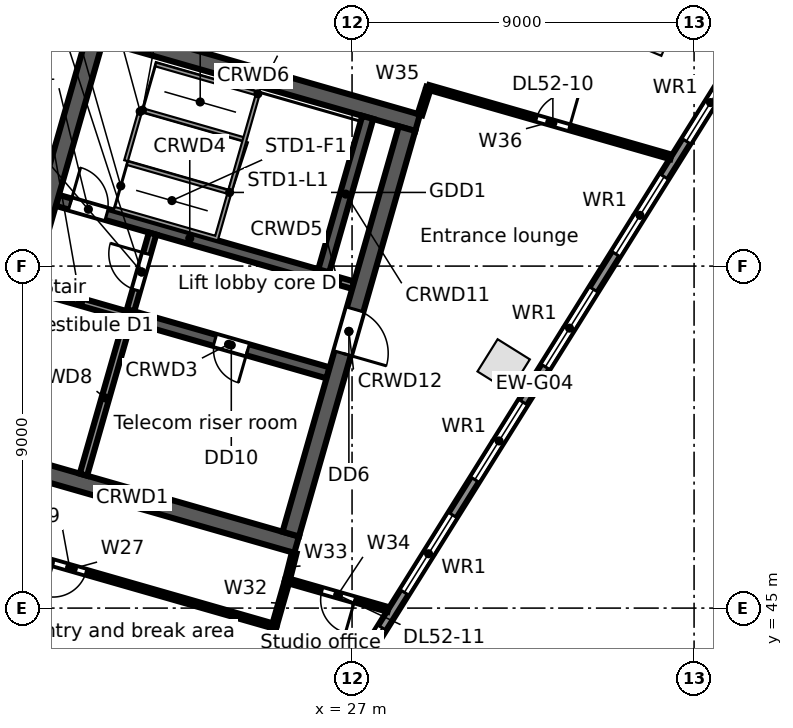
"""IFC4 building model, lengths in metres.
Left out: names, types, materials, properties, quantities, classifications, styles, units other than length and angle.
Written with IfcOpenShell. Run it as: python <this file> out.ifc"""

import sys

from ifc_helpers import new_model, si_unit, direction, frame, frame_2d, origin, origin_2d, place, context, subcontext, project, spatial, rectangle, extrude, element, fill, save


model = new_model("IFC4")
c1 = context("Model", 3, precision=1e-05, world=origin(), true_north=direction((0.0, 1.0)))
c2 = subcontext(c1, "Body", "Model", "MODEL_VIEW")
j1 = project(units=[si_unit("LENGTHUNIT", "METRE"), si_unit("PLANEANGLEUNIT", "RADIAN")], contexts=[c1])
p1 = place(None, origin())
s1 = spatial("IfcSite", under=j1, at=p1, CompositionType="ELEMENT")
p2 = place(p1, origin())
s2 = spatial("IfcBuilding", under=s1, at=p2, CompositionType="ELEMENT")
p3 = place(p2, frame((0.0, 0.0, 238.7)))
s3 = spatial("IfcBuildingStorey", under=s2, at=p3, CompositionType="ELEMENT", Elevation=238.7)
for number, where, z_axis, x_axis in (
    (1, (30.99, 51.386, 0.0), (0.0, 0.0, 1.0), (0.53, 0.848, 0.0)),
    (2, (34.87, 60.187, 0.0), (0.0, 0.0, 1.0), (-0.923, 0.385, 0.0)),
):
    element("IfcColumn", number, at=place(p3, frame(where, z_axis=z_axis, x_axis=x_axis)), inside=s3, PredefinedType="COLUMN", context=c2, shape_type="SweptSolid", body=[
        extrude(rectangle(XDim=1.0, YDim=1.0, at=origin_2d()), origin(), (0.0, 0.0, 1.0), 3.9),
    ])
p4 = place(p3, frame((24.034, 41.108, 0.0), z_axis=(0.0, 0.0, 1.0), x_axis=(-0.96126060691, 0.275641153683, 0.0)))
e3 = element("IfcWall", 3, at=p4, inside=s3, PredefinedType="STANDARD", context=c2, shape_type="SweptSolid", body=[
    extrude(rectangle(XDim=24.951, YDim=0.25, at=frame_2d((12.475, 0.0))), origin(), (0.0, 0.0, 1.0), 3.62),
])
p5 = place(p4, frame((22.416, 0.0, 0.8)))
e4 = element("IfcOpeningElement", 4, at=p5, cuts=e3, PredefinedType="OPENING", context=c2, shape_type="SweptSolid", body=[
    extrude(rectangle(XDim=2.4, YDim=2.2, at=frame_2d((1.2, 1.1))), frame((0.0, 0.135, 0.0), z_axis=(0.0, -1.0, 0.0), x_axis=(1.0, 0.0, 0.0)), (0.0, 0.0, 1.0), 0.27),
])
p6 = place(p4, frame((19.643, 0.0, 0.8)))
e5 = element("IfcOpeningElement", 5, at=p6, cuts=e3, PredefinedType="OPENING", context=c2, shape_type="SweptSolid", body=[
    extrude(rectangle(XDim=2.4, YDim=2.2, at=frame_2d((1.2, 1.1))), frame((0.0, 0.135, 0.0), z_axis=(0.0, -1.0, 0.0), x_axis=(1.0, 0.0, 0.0)), (0.0, 0.0, 1.0), 0.27),
])
p7 = place(p4, frame((16.869, 0.0, 0.8)))
e6 = element("IfcOpeningElement", 6, at=p7, cuts=e3, PredefinedType="OPENING", context=c2, shape_type="SweptSolid", body=[
    extrude(rectangle(XDim=2.4, YDim=2.2, at=frame_2d((1.2, 1.1))), frame((0.0, 0.135, 0.0), z_axis=(0.0, -1.0, 0.0), x_axis=(1.0, 0.0, 0.0)), (0.0, 0.0, 1.0), 0.27),
])
p8 = place(p4, frame((14.096, 0.0, 0.8)))
e7 = element("IfcOpeningElement", 7, at=p8, cuts=e3, PredefinedType="OPENING", context=c2, shape_type="SweptSolid", body=[
    extrude(rectangle(XDim=2.4, YDim=2.2, at=frame_2d((1.2, 1.1))), frame((0.0, 0.135, 0.0), z_axis=(0.0, -1.0, 0.0), x_axis=(1.0, 0.0, 0.0)), (0.0, 0.0, 1.0), 0.27),
])
p9 = place(p4, frame((11.622, 0.0, 0.0)))
e8 = element("IfcOpeningElement", 8, at=p9, cuts=e3, PredefinedType="OPENING", context=c2, shape_type="SweptSolid", body=[
    extrude(rectangle(XDim=1.8, YDim=2.4, at=frame_2d((0.9, 1.2))), frame((0.0, 0.135, 0.0), z_axis=(0.0, -1.0, 0.0), x_axis=(1.0, 0.0, 0.0)), (0.0, 0.0, 1.0), 0.27),
])
p10 = place(p4, frame((8.549, 0.0, 0.8)))
e9 = element("IfcOpeningElement", 9, at=p10, cuts=e3, PredefinedType="OPENING", context=c2, shape_type="SweptSolid", body=[
    extrude(rectangle(XDim=2.4, YDim=2.2, at=frame_2d((1.2, 1.1))), frame((0.0, 0.135, 0.0), z_axis=(0.0, -1.0, 0.0), x_axis=(1.0, 0.0, 0.0)), (0.0, 0.0, 1.0), 0.27),
])
p11 = place(p4, frame((5.775, 0.0, 0.8)))
e10 = element("IfcOpeningElement", 10, at=p11, cuts=e3, PredefinedType="OPENING", context=c2, shape_type="SweptSolid", body=[
    extrude(rectangle(XDim=2.4, YDim=2.2, at=frame_2d((1.2, 1.1))), frame((0.0, 0.135, 0.0), z_axis=(0.0, -1.0, 0.0), x_axis=(1.0, 0.0, 0.0)), (0.0, 0.0, 1.0), 0.27),
])
p12 = place(p4, frame((3.302, 0.0, 0.0)))
e11 = element("IfcOpeningElement", 11, at=p12, cuts=e3, PredefinedType="OPENING", context=c2, shape_type="SweptSolid", body=[
    extrude(rectangle(XDim=1.8, YDim=2.4, at=frame_2d((0.9, 1.2))), frame((0.0, 0.135, 0.0), z_axis=(0.0, -1.0, 0.0), x_axis=(1.0, 0.0, 0.0)), (0.0, 0.0, 1.0), 0.27),
])
p13 = place(p4, frame((0.229, 0.0, 0.8)))
e12 = element("IfcOpeningElement", 12, at=p13, cuts=e3, PredefinedType="OPENING", context=c2, shape_type="SweptSolid", body=[
    extrude(rectangle(XDim=2.4, YDim=2.2, at=frame_2d((1.2, 1.1))), frame((0.0, 0.135, 0.0), z_axis=(0.0, -1.0, 0.0), x_axis=(1.0, 0.0, 0.0)), (0.0, 0.0, 1.0), 0.27),
])
p14 = place(p3, frame((37.392, 59.84, 0.0), z_axis=(0.0, 0.0, 1.0), x_axis=(-0.529919909431, -0.848047692992, 0.0)))
e13 = element("IfcWall", 13, at=p14, inside=s3, PredefinedType="STANDARD", context=c2, shape_type="SweptSolid", body=[
    extrude(rectangle(XDim=21.104, YDim=0.25, at=frame_2d((10.552, 0.0))), origin(), (0.0, 0.0, 1.0), 3.62),
])
p15 = place(p14, frame((18.112, 0.0, 0.8)))
e14 = element("IfcOpeningElement", 14, at=p15, cuts=e13, PredefinedType="OPENING", context=c2, shape_type="SweptSolid", body=[
    extrude(rectangle(XDim=2.4, YDim=2.2, at=frame_2d((1.2, 1.1))), frame((0.0, 0.135, 0.0), z_axis=(0.0, -1.0, 0.0), x_axis=(1.0, 0.0, 0.0)), (0.0, 0.0, 1.0), 0.27),
])
p16 = place(p14, frame((14.612, 0.0, 0.8)))
e15 = element("IfcOpeningElement", 15, at=p16, cuts=e13, PredefinedType="OPENING", context=c2, shape_type="SweptSolid", body=[
    extrude(rectangle(XDim=2.4, YDim=2.2, at=frame_2d((1.2, 1.1))), frame((0.0, 0.135, 0.0), z_axis=(0.0, -1.0, 0.0), x_axis=(1.0, 0.0, 0.0)), (0.0, 0.0, 1.0), 0.27),
])
p17 = place(p14, frame((11.112, 0.0, 0.8)))
e16 = element("IfcOpeningElement", 16, at=p17, cuts=e13, PredefinedType="OPENING", context=c2, shape_type="SweptSolid", body=[
    extrude(rectangle(XDim=2.4, YDim=2.2, at=frame_2d((1.2, 1.1))), frame((0.0, 0.135, 0.0), z_axis=(0.0, -1.0, 0.0), x_axis=(1.0, 0.0, 0.0)), (0.0, 0.0, 1.0), 0.27),
])
p18 = place(p14, frame((7.612, 0.0, 0.8)))
e17 = element("IfcOpeningElement", 17, at=p18, cuts=e13, PredefinedType="OPENING", context=c2, shape_type="SweptSolid", body=[
    extrude(rectangle(XDim=2.4, YDim=2.2, at=frame_2d((1.2, 1.1))), frame((0.0, 0.135, 0.0), z_axis=(0.0, -1.0, 0.0), x_axis=(1.0, 0.0, 0.0)), (0.0, 0.0, 1.0), 0.27),
])
p19 = place(p14, frame((4.112, 0.0, 0.8)))
e18 = element("IfcOpeningElement", 18, at=p19, cuts=e13, PredefinedType="OPENING", context=c2, shape_type="SweptSolid", body=[
    extrude(rectangle(XDim=2.4, YDim=2.2, at=frame_2d((1.2, 1.1))), frame((0.0, 0.135, 0.0), z_axis=(0.0, -1.0, 0.0), x_axis=(1.0, 0.0, 0.0)), (0.0, 0.0, 1.0), 0.27),
])
p20 = place(p14, frame((0.612, 0.0, 0.8)))
e19 = element("IfcOpeningElement", 19, at=p20, cuts=e13, PredefinedType="OPENING", context=c2, shape_type="SweptSolid", body=[
    extrude(rectangle(XDim=2.4, YDim=2.2, at=frame_2d((1.2, 1.1))), frame((0.0, 0.135, 0.0), z_axis=(0.0, -1.0, 0.0), x_axis=(1.0, 0.0, 0.0)), (0.0, 0.0, 1.0), 0.27),
])
p21 = place(p3, frame((16.89, 49.149, 0.0), z_axis=(0.0, 0.0, 1.0), x_axis=(0.96126248289, -0.275634611374, 0.0)))
e20 = element("IfcWall", 20, at=p21, inside=s3, PredefinedType="SOLIDWALL", context=c2, shape_type="SweptSolid", body=[
    extrude(rectangle(XDim=9.0, YDim=0.45, at=frame_2d((4.5, 0.0))), origin(), (0.0, 0.0, 1.0), 3.62),
])
p22 = place(p3, frame((18.583, 53.423, 0.0), z_axis=(0.0, 0.0, 1.0), x_axis=(0.961259287968, -0.275645753268, 0.0)))
e21 = element("IfcWall", 21, at=p22, inside=s3, PredefinedType="SOLIDWALL", context=c2, shape_type="SweptSolid", body=[
    extrude(rectangle(XDim=2.65, YDim=0.2, at=frame_2d((1.325, 0.0))), origin(), (0.0, 0.0, 1.0), 3.62),
])
p23 = place(p3, frame((21.131, 52.692, 0.0), z_axis=(0.0, 0.0, 1.0), x_axis=(0.961261488075, -0.275638080722, 0.0)))
e22 = element("IfcWall", 22, at=p23, inside=s3, PredefinedType="SOLIDWALL", context=c2, shape_type="SweptSolid", body=[
    extrude(rectangle(XDim=5.45, YDim=0.3, at=frame_2d((2.725, 0.0))), origin(), (0.0, 0.0, 1.0), 3.62),
])
p24 = place(p23, frame((2.35, 0.0, 0.0)))
e23 = element("IfcOpeningElement", 23, at=p24, cuts=e22, PredefinedType="OPENING", context=c2, shape_type="SweptSolid", body=[
    extrude(rectangle(XDim=0.9, YDim=2.1, at=frame_2d((0.45, 1.05))), frame((0.0, 0.16, 0.0), z_axis=(0.0, -1.0, 0.0), x_axis=(1.0, 0.0, 0.0)), (0.0, 0.0, 1.0), 0.32),
])
p25 = place(p3, frame((19.245, 55.73, 0.0), z_axis=(0.0, 0.0, 1.0), x_axis=(0.961263007877, -0.275632780503, 0.0)))
e24 = element("IfcWall", 24, at=p25, inside=s3, PredefinedType="SOLIDWALL", context=c2, shape_type="SweptSolid", body=[
    extrude(rectangle(XDim=7.25, YDim=0.3, at=frame_2d((3.625, 0.0))), origin(), (0.0, 0.0, 1.0), 3.62),
])
p26 = place(p25, frame((0.35, 0.0, 0.0)))
e25 = element("IfcOpeningElement", 25, at=p26, cuts=e24, PredefinedType="OPENING", context=c2, shape_type="SweptSolid", body=[
    extrude(rectangle(XDim=1.0, YDim=2.1, at=frame_2d((0.5, 1.05))), frame((0.0, 0.16, 0.0), z_axis=(0.0, -1.0, 0.0), x_axis=(1.0, 0.0, 0.0)), (0.0, 0.0, 1.0), 0.32),
])
p27 = place(p3, frame((26.214, 53.732, 0.0), z_axis=(0.0, 0.0, 1.0), x_axis=(0.961241665642, -0.275707200184, 0.0)))
e26 = element("IfcWall", 26, at=p27, inside=s3, PredefinedType="SOLIDWALL", context=c2, shape_type="SweptSolid", body=[
    extrude(rectangle(XDim=0.85, YDim=0.2, at=frame_2d((0.425, 0.0))), origin(), (0.0, 0.0, 1.0), 3.62),
])
p28 = place(p3, frame((20.073, 60.252, 0.0), z_axis=(0.0, 0.0, 1.0), x_axis=(0.96126248289, -0.275634611374, 0.0)))
e27 = element("IfcWall", 27, at=p28, inside=s3, PredefinedType="SOLIDWALL", context=c2, shape_type="SweptSolid", body=[
    extrude(rectangle(XDim=9.0, YDim=0.45, at=frame_2d((4.5, 0.0))), origin(), (0.0, 0.0, 1.0), 3.62),
])
p29 = place(p3, frame((17.168, 49.303, 0.0), z_axis=(0.0, 0.0, 1.0), x_axis=(0.275638974822, 0.961261231695, 0.0)))
e28 = element("IfcWall", 28, at=p29, inside=s3, PredefinedType="SOLIDWALL", context=c2, shape_type="SweptSolid", body=[
    extrude(rectangle(XDim=11.1, YDim=0.45, at=frame_2d((5.55, 0.0))), origin(), (0.0, 0.0, 1.0), 3.62),
])
p30 = place(p29, frame((4.95, 0.0, 0.0)))
e29 = element("IfcOpeningElement", 29, at=p30, cuts=e28, PredefinedType="OPENING", context=c2, shape_type="SweptSolid", body=[
    extrude(rectangle(XDim=1.2, YDim=2.1, at=frame_2d((0.6, 1.05))), frame((0.0, 0.235, 0.0), z_axis=(0.0, -1.0, 0.0), x_axis=(1.0, 0.0, 0.0)), (0.0, 0.0, 1.0), 0.47),
])
p31 = place(p3, frame((19.932, 48.511, 0.0), z_axis=(0.0, 0.0, 1.0), x_axis=(0.275642273411, 0.961260285827, 0.0)))
e30 = element("IfcWall", 30, at=p31, inside=s3, PredefinedType="SOLIDWALL", context=c2, shape_type="SweptSolid", body=[
    extrude(rectangle(XDim=4.2, YDim=0.2, at=frame_2d((2.1, 0.0))), origin(), (0.0, 0.0, 1.0), 3.62),
])
p32 = place(p3, frame((21.172, 52.837, 0.0), z_axis=(0.0, 0.0, 1.0), x_axis=(0.275657676022, 0.961255868981, 0.0)))
e31 = element("IfcWall", 31, at=p32, inside=s3, PredefinedType="PARTITIONING", context=c2, shape_type="SweptSolid", body=[
    extrude(rectangle(XDim=2.1, YDim=0.2, at=frame_2d((1.05, 0.0))), origin(), (0.0, 0.0, 1.0), 3.62),
])
p33 = place(p32, frame((0.55, 0.0, 0.0)))
e32 = element("IfcOpeningElement", 32, at=p33, cuts=e31, PredefinedType="OPENING", context=c2, shape_type="SweptSolid", body=[
    extrude(rectangle(XDim=1.0, YDim=2.1, at=frame_2d((0.5, 1.05))), frame((0.0, 0.11, 0.0), z_axis=(0.0, -1.0, 0.0), x_axis=(1.0, 0.0, 0.0)), (0.0, 0.0, 1.0), 0.22),
])
p34 = place(p3, frame((26.256, 53.876, 0.0), z_axis=(0.0, 0.0, 1.0), x_axis=(0.275588560745, 0.96127568636, 0.0)))
e33 = element("IfcWall", 33, at=p34, inside=s3, PredefinedType="SOLIDWALL", context=c2, shape_type="SweptSolid", body=[
    extrude(rectangle(XDim=4.2, YDim=0.3, at=frame_2d((2.1, 0.0))), origin(), (0.0, 0.0, 1.0), 3.62),
])
p35 = place(p3, frame((25.387, 46.947, 0.0), z_axis=(0.0, 0.0, 1.0), x_axis=(0.275638974822, 0.961261231695, 0.0)))
e34 = element("IfcWall", 34, at=p35, inside=s3, PredefinedType="SOLIDWALL", context=c2, shape_type="SweptSolid", body=[
    extrude(rectangle(XDim=11.1, YDim=0.45, at=frame_2d((5.55, 0.0))), origin(), (0.0, 0.0, 1.0), 3.62),
])
p36 = place(p35, frame((4.95, 0.0, 0.0)))
e35 = element("IfcOpeningElement", 35, at=p36, cuts=e34, PredefinedType="OPENING", context=c2, shape_type="SweptSolid", body=[
    extrude(rectangle(XDim=1.2, YDim=2.1, at=frame_2d((0.6, 1.05))), frame((0.0, 0.235, 0.0), z_axis=(0.0, -1.0, 0.0), x_axis=(1.0, 0.0, 0.0)), (0.0, 0.0, 1.0), 0.47),
])
p37 = place(p3, frame((14.377, 47.555, 0.0), z_axis=(0.0, 0.0, 1.0), x_axis=(0.961263044958, -0.275632651182, 0.0)))
e36 = element("IfcWall", 36, at=p37, inside=s3, PredefinedType="PARTITIONING", context=c2, shape_type="SweptSolid", body=[
    extrude(rectangle(XDim=11.0, YDim=0.125, at=frame_2d((5.5, 0.0))), origin(), (0.0, 0.0, 1.0), 2.9),
])
p38 = place(p37, frame((4.95, 0.0, 0.0)))
e37 = element("IfcOpeningElement", 37, at=p38, cuts=e36, PredefinedType="OPENING", context=c2, shape_type="SweptSolid", body=[
    extrude(rectangle(XDim=0.9, YDim=2.1, at=frame_2d((0.45, 1.05))), frame((0.0, 0.073, 0.0), z_axis=(0.0, -1.0, 0.0), x_axis=(1.0, 0.0, 0.0)), (0.0, 0.0, 1.0), 0.145),
])
p39 = place(p3, frame((24.036, 41.27, 0.0), z_axis=(0.0, 0.0, 1.0), x_axis=(0.270787421954, 0.962639170256, 0.0)))
e38 = element("IfcWall", 38, at=p39, inside=s3, PredefinedType="PARTITIONING", context=c2, shape_type="SweptSolid", body=[
    extrude(rectangle(XDim=3.379, YDim=0.125, at=frame_2d((1.689, 0.0))), origin(), (0.0, 0.0, 1.0), 2.9),
])
p40 = place(p3, frame((24.951, 44.523, 0.0), z_axis=(0.0, 0.0, 1.0), x_axis=(0.27510792265, 0.961413350695, 0.0)))
e39 = element("IfcWall", 39, at=p40, inside=s3, PredefinedType="PARTITIONING", context=c2, shape_type="SweptSolid", body=[
    extrude(rectangle(XDim=1.25, YDim=0.125, at=frame_2d((0.625, 0.0))), origin(), (0.0, 0.0, 1.0), 2.9),
])
p41 = place(p3, frame((25.295, 45.725, 0.0), z_axis=(0.0, 0.0, 1.0), x_axis=(0.245522578998, 0.96939087225, 0.0)))
e40 = element("IfcWall", 40, at=p41, inside=s3, PredefinedType="PARTITIONING", context=c2, shape_type="SweptSolid", body=[
    extrude(rectangle(XDim=0.75, YDim=0.125, at=frame_2d((0.375, 0.0))), origin(), (0.0, 0.0, 1.0), 3.62),
])
p42 = place(p3, frame((25.295, 45.725, 0.0), z_axis=(0.0, 0.0, 1.0), x_axis=(0.961266594526, -0.275620271837, 0.0)))
e41 = element("IfcWall", 41, at=p42, inside=s3, PredefinedType="PARTITIONING", context=c2, shape_type="SweptSolid", body=[
    extrude(rectangle(XDim=2.761, YDim=0.125, at=frame_2d((1.38, 0.0))), origin(), (0.0, 0.0, 1.0), 2.9),
])
p43 = place(p42, frame((0.95, 0.0, 0.0)))
e42 = element("IfcOpeningElement", 42, at=p43, cuts=e41, PredefinedType="OPENING", context=c2, shape_type="SweptSolid", body=[
    extrude(rectangle(XDim=0.9, YDim=2.1, at=frame_2d((0.45, 1.05))), frame((0.0, 0.073, 0.0), z_axis=(0.0, -1.0, 0.0), x_axis=(1.0, 0.0, 0.0)), (0.0, 0.0, 1.0), 0.145),
])
p44 = place(p3, frame((28.787, 57.987, 0.0), z_axis=(0.0, 0.0, 1.0), x_axis=(0.305082548948, 0.952325909722, 0.0)))
e43 = element("IfcWall", 43, at=p44, inside=s3, PredefinedType="PARTITIONING", context=c2, shape_type="SweptSolid", body=[
    extrude(rectangle(XDim=0.751, YDim=0.125, at=frame_2d((0.375, 0.0))), origin(), (0.0, 0.0, 1.0), 3.62),
])
p45 = place(p3, frame((29.016, 58.702, 0.0), z_axis=(0.0, 0.0, 1.0), x_axis=(0.961266529031, -0.275620500262, 0.0)))
e44 = element("IfcWall", 44, at=p45, inside=s3, PredefinedType="PARTITIONING", context=c2, shape_type="SweptSolid", body=[
    extrude(rectangle(XDim=6.632, YDim=0.125, at=frame_2d((3.316, 0.0))), origin(), (0.0, 0.0, 1.0), 2.988),
])
p46 = place(p45, frame((2.95, 0.0, 0.0)))
e45 = element("IfcOpeningElement", 45, at=p46, cuts=e44, PredefinedType="OPENING", context=c2, shape_type="SweptSolid", body=[
    extrude(rectangle(XDim=0.9, YDim=2.1, at=frame_2d((0.45, 1.05))), frame((0.0, 0.073, 0.0), z_axis=(0.0, -1.0, 0.0), x_axis=(1.0, 0.0, 0.0)), (0.0, 0.0, 1.0), 0.145),
])
p47 = place(p15, origin())
e46 = element("IfcWindow", 46, at=p47, inside=s3, PartitioningType="SINGLE_PANEL", PredefinedType="WINDOW", context=c2, shape_type="SweptSolid", body=[
    extrude(rectangle(XDim=2.4, YDim=2.2, at=frame_2d((1.2, 1.1))), frame((0.0, 0.03, 0.0), z_axis=(0.0, -1.0, 0.0), x_axis=(1.0, 0.0, 0.0)), (0.0, 0.0, 1.0), 0.06),
])
fill(e14, e46)
p48 = place(p16, origin())
e47 = element("IfcWindow", 47, at=p48, inside=s3, PartitioningType="SINGLE_PANEL", PredefinedType="WINDOW", context=c2, shape_type="SweptSolid", body=[
    extrude(rectangle(XDim=2.4, YDim=2.2, at=frame_2d((1.2, 1.1))), frame((0.0, 0.03, 0.0), z_axis=(0.0, -1.0, 0.0), x_axis=(1.0, 0.0, 0.0)), (0.0, 0.0, 1.0), 0.06),
])
fill(e15, e47)
p49 = place(p17, origin())
e48 = element("IfcWindow", 48, at=p49, inside=s3, PartitioningType="SINGLE_PANEL", PredefinedType="WINDOW", context=c2, shape_type="SweptSolid", body=[
    extrude(rectangle(XDim=2.4, YDim=2.2, at=frame_2d((1.2, 1.1))), frame((0.0, 0.03, 0.0), z_axis=(0.0, -1.0, 0.0), x_axis=(1.0, 0.0, 0.0)), (0.0, 0.0, 1.0), 0.06),
])
fill(e16, e48)
p50 = place(p18, origin())
e49 = element("IfcWindow", 49, at=p50, inside=s3, PartitioningType="SINGLE_PANEL", PredefinedType="WINDOW", context=c2, shape_type="SweptSolid", body=[
    extrude(rectangle(XDim=2.4, YDim=2.2, at=frame_2d((1.2, 1.1))), frame((0.0, 0.03, 0.0), z_axis=(0.0, -1.0, 0.0), x_axis=(1.0, 0.0, 0.0)), (0.0, 0.0, 1.0), 0.06),
])
fill(e17, e49)
p51 = place(p19, origin())
e50 = element("IfcWindow", 50, at=p51, inside=s3, PartitioningType="SINGLE_PANEL", PredefinedType="WINDOW", context=c2, shape_type="SweptSolid", body=[
    extrude(rectangle(XDim=2.4, YDim=2.2, at=frame_2d((1.2, 1.1))), frame((0.0, 0.03, 0.0), z_axis=(0.0, -1.0, 0.0), x_axis=(1.0, 0.0, 0.0)), (0.0, 0.0, 1.0), 0.06),
])
fill(e18, e50)
p52 = place(p20, origin())
e51 = element("IfcWindow", 51, at=p52, inside=s3, PartitioningType="SINGLE_PANEL", PredefinedType="WINDOW", context=c2, shape_type="SweptSolid", body=[
    extrude(rectangle(XDim=2.4, YDim=2.2, at=frame_2d((1.2, 1.1))), frame((0.0, 0.03, 0.0), z_axis=(0.0, -1.0, 0.0), x_axis=(1.0, 0.0, 0.0)), (0.0, 0.0, 1.0), 0.06),
])
fill(e19, e51)
p53 = place(p26, origin())
e52 = element("IfcDoor", 52, at=p53, inside=s3, OperationType="SINGLE_SWING_LEFT", PredefinedType="DOOR", context=c2, shape_type="SweptSolid", body=[
    extrude(rectangle(XDim=1.0, YDim=2.1, at=frame_2d((0.5, 1.05))), frame((0.0, 0.025, 0.0), z_axis=(0.0, -1.0, 0.0), x_axis=(1.0, 0.0, 0.0)), (0.0, 0.0, 1.0), 0.05),
])
fill(e25, e52)
p54 = place(p33, origin())
e53 = element("IfcDoor", 53, at=p54, inside=s3, OperationType="SINGLE_SWING_RIGHT", PredefinedType="DOOR", context=c2, shape_type="SweptSolid", body=[
    extrude(rectangle(XDim=1.0, YDim=2.1, at=frame_2d((0.5, 1.05))), frame((0.0, 0.025, 0.0), z_axis=(0.0, -1.0, 0.0), x_axis=(1.0, 0.0, 0.0)), (0.0, 0.0, 1.0), 0.05),
])
fill(e32, e53)
p55 = place(p36, frame((1.2, 0.0, 0.0), z_axis=(0.0, 0.0, 1.0), x_axis=(-1.0, 0.0, 0.0)))
e54 = element("IfcDoor", 54, at=p55, inside=s3, OperationType="SINGLE_SWING_RIGHT", PredefinedType="DOOR", context=c2, shape_type="SweptSolid", body=[
    extrude(rectangle(XDim=1.2, YDim=2.1, at=frame_2d((0.6, 1.05))), frame((0.0, 0.025, 0.0), z_axis=(0.0, -1.0, 0.0), x_axis=(1.0, 0.0, 0.0)), (0.0, 0.0, 1.0), 0.05),
])
fill(e35, e54)
p56 = place(p24, frame((0.9, 0.0, 0.0), z_axis=(0.0, 0.0, 1.0), x_axis=(-1.0, 0.0, 0.0)))
e55 = element("IfcDoor", 55, at=p56, inside=s3, OperationType="SINGLE_SWING_LEFT", PredefinedType="DOOR", context=c2, shape_type="SweptSolid", body=[
    extrude(rectangle(XDim=0.9, YDim=2.1, at=frame_2d((0.45, 1.05))), frame((0.0, 0.025, 0.0), z_axis=(0.0, -1.0, 0.0), x_axis=(1.0, 0.0, 0.0)), (0.0, 0.0, 1.0), 0.05),
])
fill(e23, e55)
p57 = place(p38, frame((0.9, 0.0, 0.0), z_axis=(0.0, 0.0, 1.0), x_axis=(-1.0, 0.0, 0.0)))
e56 = element("IfcDoor", 56, at=p57, inside=s3, OperationType="SINGLE_SWING_RIGHT", PredefinedType="DOOR", context=c2, shape_type="SweptSolid", body=[
    extrude(rectangle(XDim=0.9, YDim=2.1, at=frame_2d((0.45, 1.05))), frame((0.0, 0.025, 0.0), z_axis=(0.0, -1.0, 0.0), x_axis=(1.0, 0.0, 0.0)), (0.0, 0.0, 1.0), 0.05),
])
fill(e37, e56)
p58 = place(p46, origin())
e57 = element("IfcDoor", 57, at=p58, inside=s3, OperationType="SINGLE_SWING_RIGHT", PredefinedType="DOOR", context=c2, shape_type="SweptSolid", body=[
    extrude(rectangle(XDim=0.9, YDim=2.1, at=frame_2d((0.45, 1.05))), frame((0.0, 0.025, 0.0), z_axis=(0.0, -1.0, 0.0), x_axis=(1.0, 0.0, 0.0)), (0.0, 0.0, 1.0), 0.05),
])
fill(e45, e57)
p59 = place(p43, frame((0.9, 0.0, 0.0), z_axis=(0.0, 0.0, 1.0), x_axis=(-1.0, 0.0, 0.0)))
e58 = element("IfcDoor", 58, at=p59, inside=s3, OperationType="SINGLE_SWING_LEFT", PredefinedType="DOOR", context=c2, shape_type="SweptSolid", body=[
    extrude(rectangle(XDim=0.9, YDim=2.1, at=frame_2d((0.45, 1.05))), frame((0.0, 0.025, 0.0), z_axis=(0.0, -1.0, 0.0), x_axis=(1.0, 0.0, 0.0)), (0.0, 0.0, 1.0), 0.05),
])
fill(e42, e58)
save(model, sys.argv[1])
